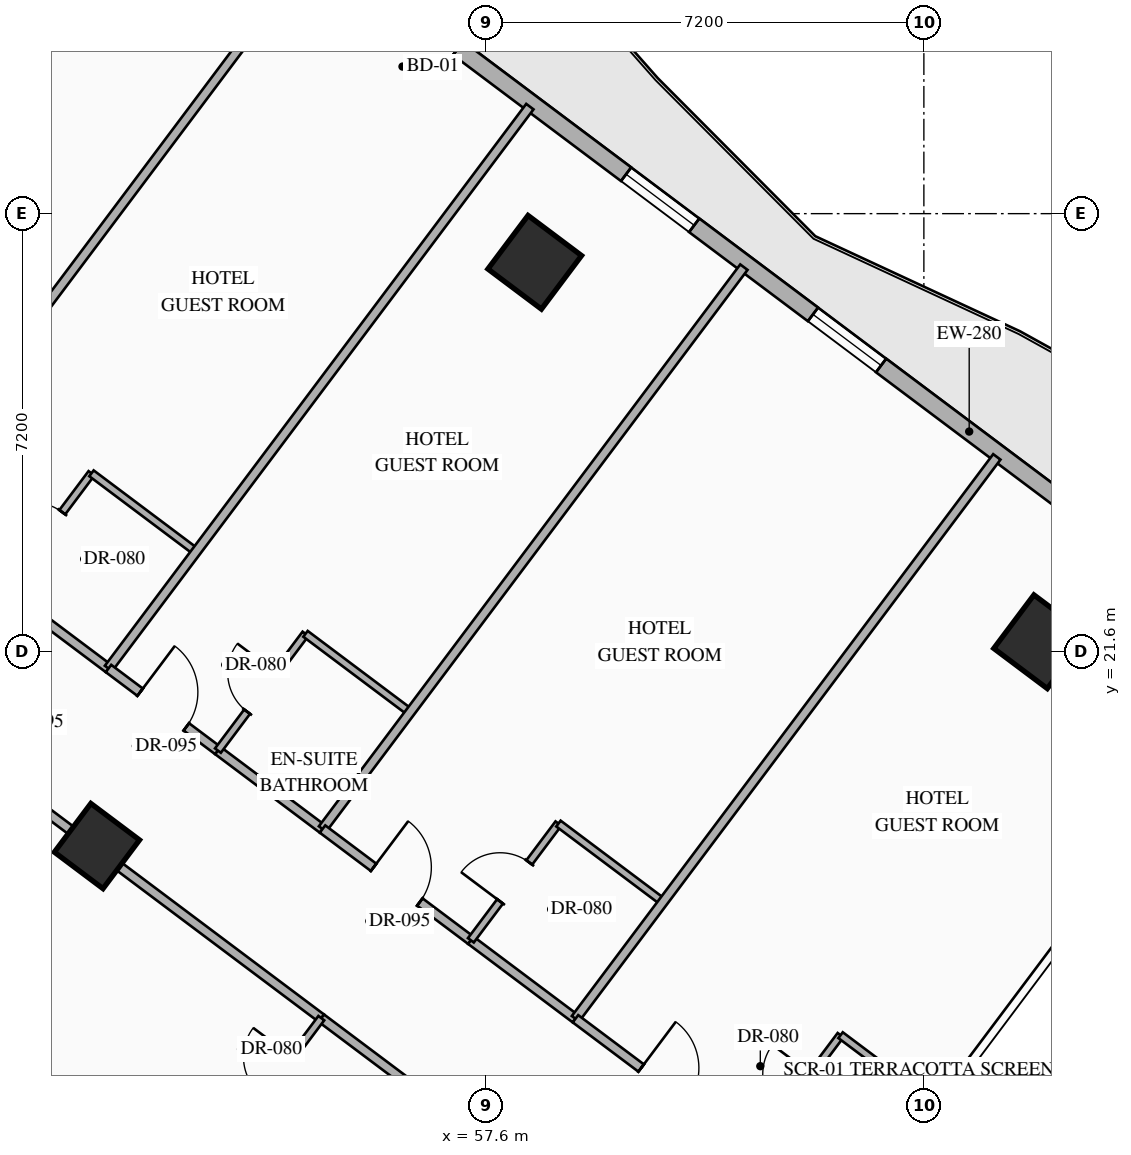
"""IFC4 building model, lengths in metres.
Left out: names, types, materials, properties, quantities, classifications, styles, units other than length and angle.
Written with IfcOpenShell. Run it as: python <this file> out.ifc"""

import sys

from ifc_helpers import new_model, si_unit, direction, frame, frame_2d, origin, origin_2d, place, context, subcontext, project, spatial, rectangle, hollow_rectangle, extrude, element, fill, save


model = new_model("IFC4")
c1 = context("Model", 3, precision=1e-05, world=origin(), true_north=direction((0.0, 1.0)))
c2 = subcontext(c1, "Body", "Model", "MODEL_VIEW")
j1 = project(units=[si_unit("LENGTHUNIT", "METRE"), si_unit("PLANEANGLEUNIT", "RADIAN")], contexts=[c1])
p1 = place(None, origin())
s1 = spatial("IfcSite", under=j1, at=p1, CompositionType="ELEMENT")
p2 = place(p1, origin())
s2 = spatial("IfcBuilding", under=s1, at=p2, CompositionType="ELEMENT")
p3 = place(p2, frame((0.0, 0.0, 60.05)))
s3 = spatial("IfcBuildingStorey", under=s2, at=p3, CompositionType="ELEMENT", Elevation=60.05)
p4 = place(p3, frame((58.4, 28.0, 0.0), z_axis=(0.0, 0.0, 1.0), x_axis=(0.799999996291, -0.600000004945, 0.0)))
e1 = element("IfcColumn", 1, at=p4, inside=s3, PredefinedType="COLUMN", context=c2, shape_type="SweptSolid", body=[
    extrude(hollow_rectangle(XDim=1.1, YDim=1.1, WallThickness=0.04, at=origin_2d()), origin(), (0.0, 0.0, 1.0), 3.35),
])
p5 = place(p3, frame((51.2, 18.4, 0.0), z_axis=(0.0, 0.0, 1.0), x_axis=(0.799999996291, -0.600000004945, 0.0)))
e2 = element("IfcColumn", 2, at=p5, inside=s3, PredefinedType="COLUMN", context=c2, shape_type="SweptSolid", body=[
    extrude(hollow_rectangle(XDim=1.0, YDim=1.0, WallThickness=0.038, at=origin_2d()), origin(), (0.0, 0.0, 1.0), 3.35),
])
p6 = place(p3, frame((66.72, 21.76, 0.0), z_axis=(0.0, 0.0, 1.0), x_axis=(0.799999996291, -0.600000004945, 0.0)))
e3 = element("IfcColumn", 3, at=p6, inside=s3, PredefinedType="COLUMN", context=c2, shape_type="SweptSolid", body=[
    extrude(hollow_rectangle(XDim=1.1, YDim=1.1, WallThickness=0.04, at=origin_2d()), origin(), (0.0, 0.0, 1.0), 3.35),
])
p7 = place(p3, frame((44.86, 40.73, 0.0), z_axis=(0.0, 0.0, 1.0), x_axis=(0.800006902154, -0.599990797017, 0.0)))
e4 = element("IfcWall", 4, at=p7, inside=s3, PredefinedType="STANDARD", context=c2, shape_type="SweptSolid", body=[
    extrude(rectangle(XDim=29.712, YDim=0.28, at=frame_2d((14.856, 0.0))), origin(), (0.0, 0.0, 1.0), 3.13),
])
p8 = place(p7, frame((14.249, 0.0, 0.0)))
e5 = element("IfcOpeningElement", 5, at=p8, cuts=e4, PredefinedType="OPENING", context=c2, shape_type="SweptSolid", body=[
    extrude(rectangle(XDim=1.1, YDim=2.2, at=frame_2d((0.55, 1.1))), frame((0.0, 0.15, 0.0), z_axis=(0.0, -1.0, 0.0), x_axis=(1.0, 0.0, 0.0)), (0.0, 0.0, 1.0), 0.3),
])
p9 = place(p7, frame((1.612, 0.0, 0.85)))
e6 = element("IfcOpeningElement", 6, at=p9, cuts=e4, PredefinedType="OPENING", context=c2, shape_type="SweptSolid", body=[
    extrude(rectangle(XDim=1.4, YDim=1.8, at=frame_2d((0.7, 0.9))), frame((0.0, 0.15, 0.0), z_axis=(0.0, -1.0, 0.0), x_axis=(1.0, 0.0, 0.0)), (0.0, 0.0, 1.0), 0.3),
])
p10 = place(p7, frame((5.667, 0.0, 0.85)))
e7 = element("IfcOpeningElement", 7, at=p10, cuts=e4, PredefinedType="OPENING", context=c2, shape_type="SweptSolid", body=[
    extrude(rectangle(XDim=1.4, YDim=1.8, at=frame_2d((0.7, 0.9))), frame((0.0, 0.15, 0.0), z_axis=(0.0, -1.0, 0.0), x_axis=(1.0, 0.0, 0.0)), (0.0, 0.0, 1.0), 0.3),
])
p11 = place(p7, frame((9.912, 0.0, 0.85)))
e8 = element("IfcOpeningElement", 8, at=p11, cuts=e4, PredefinedType="OPENING", context=c2, shape_type="SweptSolid", body=[
    extrude(rectangle(XDim=1.4, YDim=1.8, at=frame_2d((0.7, 0.9))), frame((0.0, 0.15, 0.0), z_axis=(0.0, -1.0, 0.0), x_axis=(1.0, 0.0, 0.0)), (0.0, 0.0, 1.0), 0.3),
])
p12 = place(p7, frame((18.803, 0.0, 0.85)))
e9 = element("IfcOpeningElement", 9, at=p12, cuts=e4, PredefinedType="OPENING", context=c2, shape_type="SweptSolid", body=[
    extrude(rectangle(XDim=1.4, YDim=1.8, at=frame_2d((0.7, 0.9))), frame((0.0, 0.15, 0.0), z_axis=(0.0, -1.0, 0.0), x_axis=(1.0, 0.0, 0.0)), (0.0, 0.0, 1.0), 0.3),
])
p13 = place(p7, frame((22.645, 0.0, 0.85)))
e10 = element("IfcOpeningElement", 10, at=p13, cuts=e4, PredefinedType="OPENING", context=c2, shape_type="SweptSolid", body=[
    extrude(rectangle(XDim=1.4, YDim=1.8, at=frame_2d((0.7, 0.9))), frame((0.0, 0.15, 0.0), z_axis=(0.0, -1.0, 0.0), x_axis=(1.0, 0.0, 0.0)), (0.0, 0.0, 1.0), 0.3),
])
p14 = place(p7, frame((27.668, 0.0, 0.85)))
e11 = element("IfcOpeningElement", 11, at=p14, cuts=e4, PredefinedType="OPENING", context=c2, shape_type="SweptSolid", body=[
    extrude(rectangle(XDim=1.4, YDim=1.8, at=frame_2d((0.7, 0.9))), frame((0.0, 0.15, 0.0), z_axis=(0.0, -1.0, 0.0), x_axis=(1.0, 0.0, 0.0)), (0.0, 0.0, 1.0), 0.3),
])
p15 = place(p3, frame((53.318, 2.487, 0.0), z_axis=(0.0, 0.0, 1.0), x_axis=(-0.800004174678, 0.599994433723, 0.0)))
e12 = element("IfcWall", 12, at=p15, inside=s3, PredefinedType="STANDARD", context=c2, shape_type="SweptSolid", body=[
    extrude(rectangle(XDim=35.089, YDim=0.28, at=frame_2d((17.544, 0.0))), origin(), (0.0, 0.0, 1.0), 3.13),
])
p16 = place(p15, frame((1.931, 0.0, 0.85)))
e13 = element("IfcOpeningElement", 13, at=p16, cuts=e12, PredefinedType="OPENING", context=c2, shape_type="SweptSolid", body=[
    extrude(rectangle(XDim=1.4, YDim=1.8, at=frame_2d((0.7, 0.9))), frame((0.0, 0.15, 0.0), z_axis=(0.0, -1.0, 0.0), x_axis=(1.0, 0.0, 0.0)), (0.0, 0.0, 1.0), 0.3),
])
p17 = place(p15, frame((6.819, 0.0, 0.85)))
e14 = element("IfcOpeningElement", 14, at=p17, cuts=e12, PredefinedType="OPENING", context=c2, shape_type="SweptSolid", body=[
    extrude(rectangle(XDim=1.4, YDim=1.8, at=frame_2d((0.7, 0.9))), frame((0.0, 0.15, 0.0), z_axis=(0.0, -1.0, 0.0), x_axis=(1.0, 0.0, 0.0)), (0.0, 0.0, 1.0), 0.3),
])
p18 = place(p15, frame((11.832, 0.0, 0.85)))
e15 = element("IfcOpeningElement", 15, at=p18, cuts=e12, PredefinedType="OPENING", context=c2, shape_type="SweptSolid", body=[
    extrude(rectangle(XDim=1.4, YDim=1.8, at=frame_2d((0.7, 0.9))), frame((0.0, 0.15, 0.0), z_axis=(0.0, -1.0, 0.0), x_axis=(1.0, 0.0, 0.0)), (0.0, 0.0, 1.0), 0.3),
])
p19 = place(p15, frame((17.647, 0.0, 0.85)))
e16 = element("IfcOpeningElement", 16, at=p19, cuts=e12, PredefinedType="OPENING", context=c2, shape_type="SweptSolid", body=[
    extrude(rectangle(XDim=1.4, YDim=1.8, at=frame_2d((0.7, 0.9))), frame((0.0, 0.15, 0.0), z_axis=(0.0, -1.0, 0.0), x_axis=(1.0, 0.0, 0.0)), (0.0, 0.0, 1.0), 0.3),
])
p20 = place(p15, frame((21.857, 0.0, 0.85)))
e17 = element("IfcOpeningElement", 17, at=p20, cuts=e12, PredefinedType="OPENING", context=c2, shape_type="SweptSolid", body=[
    extrude(rectangle(XDim=1.4, YDim=1.8, at=frame_2d((0.7, 0.9))), frame((0.0, 0.15, 0.0), z_axis=(0.0, -1.0, 0.0), x_axis=(1.0, 0.0, 0.0)), (0.0, 0.0, 1.0), 0.3),
])
p21 = place(p15, frame((26.87, 0.0, 0.85)))
e18 = element("IfcOpeningElement", 18, at=p21, cuts=e12, PredefinedType="OPENING", context=c2, shape_type="SweptSolid", body=[
    extrude(rectangle(XDim=1.4, YDim=1.8, at=frame_2d((0.7, 0.9))), frame((0.0, 0.15, 0.0), z_axis=(0.0, -1.0, 0.0), x_axis=(1.0, 0.0, 0.0)), (0.0, 0.0, 1.0), 0.3),
])
p22 = place(p15, frame((31.757, 0.0, 0.85)))
e19 = element("IfcOpeningElement", 19, at=p22, cuts=e12, PredefinedType="OPENING", context=c2, shape_type="SweptSolid", body=[
    extrude(rectangle(XDim=1.4, YDim=1.8, at=frame_2d((0.7, 0.9))), frame((0.0, 0.15, 0.0), z_axis=(0.0, -1.0, 0.0), x_axis=(1.0, 0.0, 0.0)), (0.0, 0.0, 1.0), 0.3),
])
p23 = place(p3, frame((49.67, 22.61, 0.0), z_axis=(0.0, 0.0, 1.0), x_axis=(0.79998637334, -0.60001816845, 0.0)))
e20 = element("IfcWall", 20, at=p23, inside=s3, PredefinedType="PARTITIONING", context=c2, shape_type="SweptSolid", body=[
    extrude(rectangle(XDim=2.15, YDim=0.15, at=frame_2d((1.075, 0.0))), origin(), (0.0, 0.0, 1.0), 2.775),
])
p24 = place(p3, frame((49.67, 22.61, 0.0), z_axis=(0.0, 0.0, 1.0), x_axis=(0.600065100855, 0.79995117022, 0.0)))
e21 = element("IfcWall", 21, at=p24, inside=s3, PredefinedType="PARTITIONING", context=c2, shape_type="SweptSolid", body=[
    extrude(rectangle(XDim=2.4, YDim=0.12, at=frame_2d((1.2, 0.0))), origin(), (0.0, 0.0, 1.0), 3.13),
])
p25 = place(p24, frame((0.8, 0.0, 0.0)))
e22 = element("IfcOpeningElement", 22, at=p25, cuts=e21, PredefinedType="OPENING", context=c2, shape_type="SweptSolid", body=[
    extrude(rectangle(XDim=0.8, YDim=2.06, at=frame_2d((0.4, 1.03))), frame((0.0, 0.07, 0.0), z_axis=(0.0, -1.0, 0.0), x_axis=(1.0, 0.0, 0.0)), (0.0, 0.0, 1.0), 0.14),
])
p26 = place(p3, frame((51.11, 24.53, 0.0), z_axis=(0.0, 0.0, 1.0), x_axis=(0.79998637334, -0.60001816845, 0.0)))
e23 = element("IfcWall", 23, at=p26, inside=s3, PredefinedType="PARTITIONING", context=c2, shape_type="SweptSolid", body=[
    extrude(rectangle(XDim=2.15, YDim=0.12, at=frame_2d((1.075, 0.0))), origin(), (0.0, 0.0, 1.0), 3.13),
])
for number, where, z_axis, x_axis in (
    (24, (47.87, 23.96, 0.0), (0.0, 0.0, 1.0), (0.6, 0.8, 0.0)),
    (25, (51.39, 21.32, 0.0), (0.0, 0.0, 1.0), (0.6, 0.8, 0.0)),
):
    element("IfcWall", number, at=place(p3, frame(where, z_axis=z_axis, x_axis=x_axis)), inside=s3, PredefinedType="PARTITIONING", context=c2, shape_type="SweptSolid", body=[
        extrude(rectangle(XDim=11.55, YDim=0.15, at=frame_2d((5.775, 0.0))), origin(), (0.0, 0.0, 1.0), 3.13),
    ])
p27 = place(p3, frame((51.39, 21.32, 0.0), z_axis=(0.0, 0.0, 1.0), x_axis=(0.799986979543, -0.600017360216, 0.0)))
e26 = element("IfcWall", 26, at=p27, inside=s3, PredefinedType="PARTITIONING", context=c2, shape_type="SweptSolid", body=[
    extrude(rectangle(XDim=2.25, YDim=0.15, at=frame_2d((1.125, 0.0))), origin(), (0.0, 0.0, 1.0), 2.775),
])
p28 = place(p27, frame((0.65, 0.0, 0.0)))
e27 = element("IfcOpeningElement", 27, at=p28, cuts=e26, PredefinedType="OPENING", context=c2, shape_type="SweptSolid", body=[
    extrude(rectangle(XDim=0.95, YDim=2.15, at=frame_2d((0.475, 1.075))), frame((0.0, 0.085, 0.0), z_axis=(0.0, -1.0, 0.0), x_axis=(1.0, 0.0, 0.0)), (0.0, 0.0, 1.0), 0.17),
])
p29 = place(p3, frame((53.19, 19.97, 0.0), z_axis=(0.0, 0.0, 1.0), x_axis=(0.79998637334, -0.60001816845, 0.0)))
e28 = element("IfcWall", 28, at=p29, inside=s3, PredefinedType="PARTITIONING", context=c2, shape_type="SweptSolid", body=[
    extrude(rectangle(XDim=2.15, YDim=0.15, at=frame_2d((1.075, 0.0))), origin(), (0.0, 0.0, 1.0), 2.775),
])
p30 = place(p3, frame((53.19, 19.97, 0.0), z_axis=(0.0, 0.0, 1.0), x_axis=(0.6, 0.8, 0.0)))
e29 = element("IfcWall", 29, at=p30, inside=s3, PredefinedType="PARTITIONING", context=c2, shape_type="SweptSolid", body=[
    extrude(rectangle(XDim=2.4, YDim=0.12, at=frame_2d((1.2, 0.0))), origin(), (0.0, 0.0, 1.0), 3.13),
])
p31 = place(p30, frame((0.8, 0.0, 0.0)))
e30 = element("IfcOpeningElement", 30, at=p31, cuts=e29, PredefinedType="OPENING", context=c2, shape_type="SweptSolid", body=[
    extrude(rectangle(XDim=0.8, YDim=2.06, at=frame_2d((0.4, 1.03))), frame((0.0, 0.07, 0.0), z_axis=(0.0, -1.0, 0.0), x_axis=(1.0, 0.0, 0.0)), (0.0, 0.0, 1.0), 0.14),
])
p32 = place(p3, frame((54.63, 21.89, 0.0), z_axis=(0.0, 0.0, 1.0), x_axis=(0.800081749437, -0.599890985279, 0.0)))
e31 = element("IfcWall", 31, at=p32, inside=s3, PredefinedType="PARTITIONING", context=c2, shape_type="SweptSolid", body=[
    extrude(rectangle(XDim=2.15, YDim=0.12, at=frame_2d((1.075, 0.0))), origin(), (0.0, 0.0, 1.0), 3.13),
])
p33 = place(p3, frame((54.91, 18.68, 0.0), z_axis=(0.0, 0.0, 1.0), x_axis=(0.60001014597, 0.799992390422, 0.0)))
e32 = element("IfcWall", 32, at=p33, inside=s3, PredefinedType="PARTITIONING", context=c2, shape_type="SweptSolid", body=[
    extrude(rectangle(XDim=11.55, YDim=0.15, at=frame_2d((5.775, 0.0))), origin(), (0.0, 0.0, 1.0), 3.13),
])
p34 = place(p3, frame((54.91, 18.68, 0.0), z_axis=(0.0, 0.0, 1.0), x_axis=(0.800048024332, -0.599935962218, 0.0)))
e33 = element("IfcWall", 33, at=p34, inside=s3, PredefinedType="PARTITIONING", context=c2, shape_type="SweptSolid", body=[
    extrude(rectangle(XDim=3.05, YDim=0.15, at=frame_2d((1.525, 0.0))), origin(), (0.0, 0.0, 1.0), 2.775),
])
p35 = place(p34, frame((1.05, 0.0, 0.0)))
e34 = element("IfcOpeningElement", 34, at=p35, cuts=e33, PredefinedType="OPENING", context=c2, shape_type="SweptSolid", body=[
    extrude(rectangle(XDim=0.95, YDim=2.15, at=frame_2d((0.475, 1.075))), frame((0.0, 0.085, 0.0), z_axis=(0.0, -1.0, 0.0), x_axis=(1.0, 0.0, 0.0)), (0.0, 0.0, 1.0), 0.17),
])
p36 = place(p3, frame((57.35, 16.85, 0.0), z_axis=(0.0, 0.0, 1.0), x_axis=(0.79998637334, -0.60001816845, 0.0)))
e35 = element("IfcWall", 35, at=p36, inside=s3, PredefinedType="PARTITIONING", context=c2, shape_type="SweptSolid", body=[
    extrude(rectangle(XDim=2.15, YDim=0.15, at=frame_2d((1.075, 0.0))), origin(), (0.0, 0.0, 1.0), 2.775),
])
p37 = place(p3, frame((57.35, 16.85, 0.0), z_axis=(0.0, 0.0, 1.0), x_axis=(0.6, 0.8, 0.0)))
e36 = element("IfcWall", 36, at=p37, inside=s3, PredefinedType="PARTITIONING", context=c2, shape_type="SweptSolid", body=[
    extrude(rectangle(XDim=2.4, YDim=0.12, at=frame_2d((1.2, 0.0))), origin(), (0.0, 0.0, 1.0), 3.13),
])
p38 = place(p37, frame((0.8, 0.0, 0.0)))
e37 = element("IfcOpeningElement", 37, at=p38, cuts=e36, PredefinedType="OPENING", context=c2, shape_type="SweptSolid", body=[
    extrude(rectangle(XDim=0.8, YDim=2.06, at=frame_2d((0.4, 1.03))), frame((0.0, 0.07, 0.0), z_axis=(0.0, -1.0, 0.0), x_axis=(1.0, 0.0, 0.0)), (0.0, 0.0, 1.0), 0.14),
])
p39 = place(p3, frame((58.79, 18.77, 0.0), z_axis=(0.0, 0.0, 1.0), x_axis=(0.79998637334, -0.60001816845, 0.0)))
e38 = element("IfcWall", 38, at=p39, inside=s3, PredefinedType="PARTITIONING", context=c2, shape_type="SweptSolid", body=[
    extrude(rectangle(XDim=2.15, YDim=0.12, at=frame_2d((1.075, 0.0))), origin(), (0.0, 0.0, 1.0), 3.13),
])
p40 = place(p3, frame((59.07, 15.56, 0.0), z_axis=(0.0, 0.0, 1.0), x_axis=(0.599996617946, 0.80000253653, 0.0)))
e39 = element("IfcWall", 39, at=p40, inside=s3, PredefinedType="PARTITIONING", context=c2, shape_type="SweptSolid", body=[
    extrude(rectangle(XDim=11.55, YDim=0.15, at=frame_2d((5.775, 0.0))), origin(), (0.0, 0.0, 1.0), 3.13),
])
p41 = place(p3, frame((59.07, 15.56, 0.0), z_axis=(0.0, 0.0, 1.0), x_axis=(0.8, -0.6, 0.0)))
e40 = element("IfcWall", 40, at=p41, inside=s3, PredefinedType="PARTITIONING", context=c2, shape_type="SweptSolid", body=[
    extrude(rectangle(XDim=3.65, YDim=0.15, at=frame_2d((1.825, 0.0))), origin(), (0.0, 0.0, 1.0), 2.775),
])
p42 = place(p41, frame((1.35, 0.0, 0.0)))
e41 = element("IfcOpeningElement", 41, at=p42, cuts=e40, PredefinedType="OPENING", context=c2, shape_type="SweptSolid", body=[
    extrude(rectangle(XDim=0.95, YDim=2.15, at=frame_2d((0.475, 1.075))), frame((0.0, 0.085, 0.0), z_axis=(0.0, -1.0, 0.0), x_axis=(1.0, 0.0, 0.0)), (0.0, 0.0, 1.0), 0.17),
])
p43 = place(p3, frame((61.99, 13.37, 0.0), z_axis=(0.0, 0.0, 1.0), x_axis=(0.6, 0.8, 0.0)))
e42 = element("IfcWall", 42, at=p43, inside=s3, PredefinedType="PARTITIONING", context=c2, shape_type="SweptSolid", body=[
    extrude(rectangle(XDim=2.4, YDim=0.12, at=frame_2d((1.2, 0.0))), origin(), (0.0, 0.0, 1.0), 3.13),
])
p44 = place(p43, frame((0.8, 0.0, 0.0)))
e43 = element("IfcOpeningElement", 43, at=p44, cuts=e42, PredefinedType="OPENING", context=c2, shape_type="SweptSolid", body=[
    extrude(rectangle(XDim=0.8, YDim=2.06, at=frame_2d((0.4, 1.03))), frame((0.0, 0.07, 0.0), z_axis=(0.0, -1.0, 0.0), x_axis=(1.0, 0.0, 0.0)), (0.0, 0.0, 1.0), 0.14),
])
p45 = place(p3, frame((63.43, 15.29, 0.0), z_axis=(0.0, 0.0, 1.0), x_axis=(0.800014574191, -0.599980567254, 0.0)))
e44 = element("IfcWall", 44, at=p45, inside=s3, PredefinedType="PARTITIONING", context=c2, shape_type="SweptSolid", body=[
    extrude(rectangle(XDim=2.01, YDim=0.12, at=frame_2d((1.005, 0.0))), origin(), (0.0, 0.0, 1.0), 3.13),
])
p46 = place(p3, frame((46.37, 21.96, 0.0), z_axis=(0.0, 0.0, 1.0), x_axis=(0.799997249048, -0.600003667918, 0.0)))
e45 = element("IfcWall", 45, at=p46, inside=s3, PredefinedType="PARTITIONING", context=c2, shape_type="SweptSolid", body=[
    extrude(rectangle(XDim=10.65, YDim=0.15, at=frame_2d((5.325, 0.0))), origin(), (0.0, 0.0, 1.0), 2.425),
])
p47 = place(p46, frame((3.062, 0.0, 0.0)))
e46 = element("IfcOpeningElement", 46, at=p47, cuts=e45, PredefinedType="OPENING", context=c2, shape_type="SweptSolid", body=[
    extrude(rectangle(XDim=0.95, YDim=2.15, at=frame_2d((0.475, 1.075))), frame((0.0, 0.085, 0.0), z_axis=(0.0, -1.0, 0.0), x_axis=(1.0, 0.0, 0.0)), (0.0, 0.0, 1.0), 0.17),
])
p48 = place(p3, frame((54.89, 15.57, 0.0), z_axis=(0.0, 0.0, 1.0), x_axis=(0.800027249606, -0.599963665473, 0.0)))
e47 = element("IfcWall", 47, at=p48, inside=s3, PredefinedType="PARTITIONING", context=c2, shape_type="SweptSolid", body=[
    extrude(rectangle(XDim=2.15, YDim=0.15, at=frame_2d((1.075, 0.0))), origin(), (0.0, 0.0, 1.0), 2.425),
])
p49 = place(p3, frame((53.45, 13.65, 0.0), z_axis=(0.0, 0.0, 1.0), x_axis=(0.599951172744, 0.800036618114, 0.0)))
e48 = element("IfcWall", 48, at=p49, inside=s3, PredefinedType="PARTITIONING", context=c2, shape_type="SweptSolid", body=[
    extrude(rectangle(XDim=2.4, YDim=0.12, at=frame_2d((1.2, 0.0))), origin(), (0.0, 0.0, 1.0), 3.13),
])
p50 = place(p49, frame((0.8, 0.0, 0.0)))
e49 = element("IfcOpeningElement", 49, at=p50, cuts=e48, PredefinedType="OPENING", context=c2, shape_type="SweptSolid", body=[
    extrude(rectangle(XDim=0.8, YDim=2.06, at=frame_2d((0.4, 1.03))), frame((0.0, 0.07, 0.0), z_axis=(0.0, -1.0, 0.0), x_axis=(1.0, 0.0, 0.0)), (0.0, 0.0, 1.0), 0.14),
])
p51 = place(p12, origin())
e50 = element("IfcWindow", 50, at=p51, inside=s3, PartitioningType="SINGLE_PANEL", PredefinedType="WINDOW", context=c2, shape_type="SweptSolid", body=[
    extrude(rectangle(XDim=1.4, YDim=1.8, at=frame_2d((0.7, 0.9))), frame((0.0, 0.03, 0.0), z_axis=(0.0, -1.0, 0.0), x_axis=(1.0, 0.0, 0.0)), (0.0, 0.0, 1.0), 0.06),
])
fill(e9, e50)
p52 = place(p13, origin())
e51 = element("IfcWindow", 51, at=p52, inside=s3, PartitioningType="SINGLE_PANEL", PredefinedType="WINDOW", context=c2, shape_type="SweptSolid", body=[
    extrude(rectangle(XDim=1.4, YDim=1.8, at=frame_2d((0.7, 0.9))), frame((0.0, 0.03, 0.0), z_axis=(0.0, -1.0, 0.0), x_axis=(1.0, 0.0, 0.0)), (0.0, 0.0, 1.0), 0.06),
])
fill(e10, e51)
p53 = place(p25, origin())
e52 = element("IfcDoor", 52, at=p53, inside=s3, OperationType="SINGLE_SWING_LEFT", PredefinedType="DOOR", context=c2, shape_type="SweptSolid", body=[
    extrude(rectangle(XDim=0.8, YDim=2.06, at=frame_2d((0.4, 1.03))), frame((0.0, 0.025, 0.0), z_axis=(0.0, -1.0, 0.0), x_axis=(1.0, 0.0, 0.0)), (0.0, 0.0, 1.0), 0.05),
])
fill(e22, e52)
p54 = place(p28, origin())
e53 = element("IfcDoor", 53, at=p54, inside=s3, OperationType="SINGLE_SWING_LEFT", PredefinedType="DOOR", context=c2, shape_type="SweptSolid", body=[
    extrude(rectangle(XDim=0.95, YDim=2.15, at=frame_2d((0.475, 1.075))), frame((0.0, 0.025, 0.0), z_axis=(0.0, -1.0, 0.0), x_axis=(1.0, 0.0, 0.0)), (0.0, 0.0, 1.0), 0.05),
])
fill(e27, e53)
p55 = place(p31, origin())
e54 = element("IfcDoor", 54, at=p55, inside=s3, OperationType="SINGLE_SWING_RIGHT", PredefinedType="DOOR", context=c2, shape_type="SweptSolid", body=[
    extrude(rectangle(XDim=0.8, YDim=2.06, at=frame_2d((0.4, 1.03))), frame((0.0, 0.025, 0.0), z_axis=(0.0, -1.0, 0.0), x_axis=(1.0, 0.0, 0.0)), (0.0, 0.0, 1.0), 0.05),
])
fill(e30, e54)
p56 = place(p35, origin())
e55 = element("IfcDoor", 55, at=p56, inside=s3, OperationType="SINGLE_SWING_LEFT", PredefinedType="DOOR", context=c2, shape_type="SweptSolid", body=[
    extrude(rectangle(XDim=0.95, YDim=2.15, at=frame_2d((0.475, 1.075))), frame((0.0, 0.025, 0.0), z_axis=(0.0, -1.0, 0.0), x_axis=(1.0, 0.0, 0.0)), (0.0, 0.0, 1.0), 0.05),
])
fill(e34, e55)
p57 = place(p38, origin())
e56 = element("IfcDoor", 56, at=p57, inside=s3, OperationType="SINGLE_SWING_LEFT", PredefinedType="DOOR", context=c2, shape_type="SweptSolid", body=[
    extrude(rectangle(XDim=0.8, YDim=2.06, at=frame_2d((0.4, 1.03))), frame((0.0, 0.025, 0.0), z_axis=(0.0, -1.0, 0.0), x_axis=(1.0, 0.0, 0.0)), (0.0, 0.0, 1.0), 0.05),
])
fill(e37, e56)
p58 = place(p42, origin())
e57 = element("IfcDoor", 57, at=p58, inside=s3, OperationType="SINGLE_SWING_LEFT", PredefinedType="DOOR", context=c2, shape_type="SweptSolid", body=[
    extrude(rectangle(XDim=0.95, YDim=2.15, at=frame_2d((0.475, 1.075))), frame((0.0, 0.025, 0.0), z_axis=(0.0, -1.0, 0.0), x_axis=(1.0, 0.0, 0.0)), (0.0, 0.0, 1.0), 0.05),
])
fill(e41, e57)
p59 = place(p44, origin())
e58 = element("IfcDoor", 58, at=p59, inside=s3, OperationType="SINGLE_SWING_RIGHT", PredefinedType="DOOR", context=c2, shape_type="SweptSolid", body=[
    extrude(rectangle(XDim=0.8, YDim=2.06, at=frame_2d((0.4, 1.03))), frame((0.0, 0.025, 0.0), z_axis=(0.0, -1.0, 0.0), x_axis=(1.0, 0.0, 0.0)), (0.0, 0.0, 1.0), 0.05),
])
fill(e43, e58)
p60 = place(p50, origin())
e59 = element("IfcDoor", 59, at=p60, inside=s3, OperationType="SINGLE_SWING_RIGHT", PredefinedType="DOOR", context=c2, shape_type="SweptSolid", body=[
    extrude(rectangle(XDim=0.8, YDim=2.06, at=frame_2d((0.4, 1.03))), frame((0.0, 0.025, 0.0), z_axis=(0.0, -1.0, 0.0), x_axis=(1.0, 0.0, 0.0)), (0.0, 0.0, 1.0), 0.05),
])
fill(e49, e59)
save(model, sys.argv[1])
